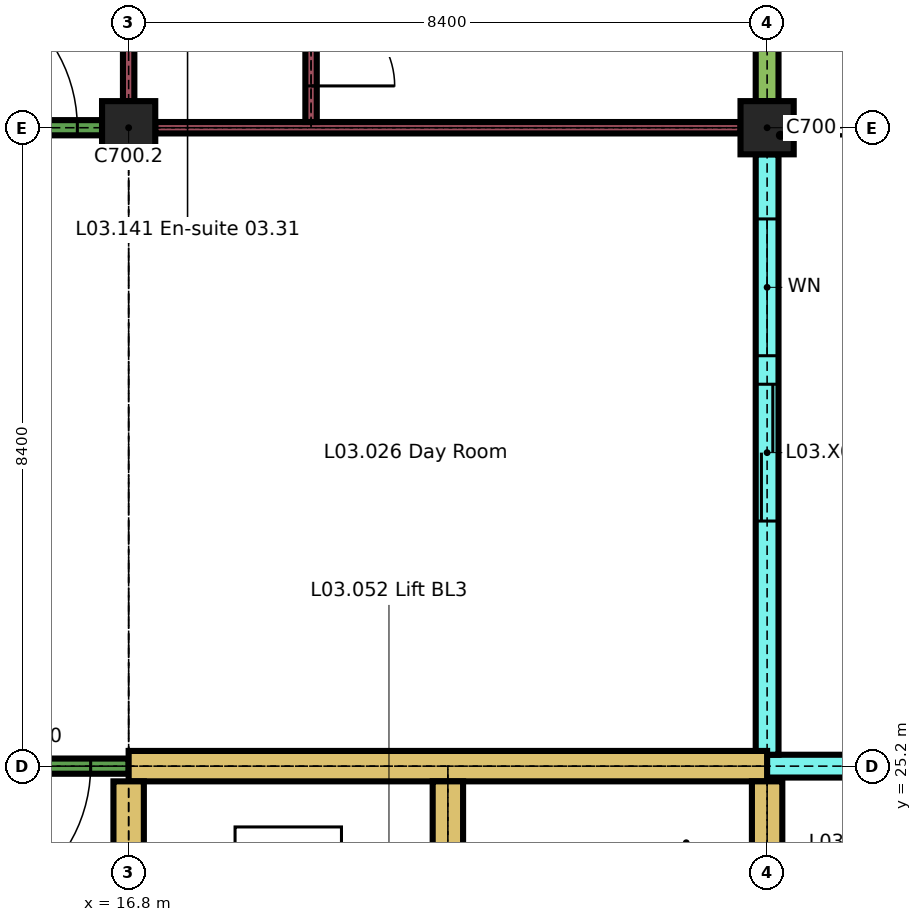
"""IFC4 building model, lengths in metres.
Left out: names, types, materials, properties, quantities, classifications, styles, units other than length and angle.
Written with IfcOpenShell. Run it as: python <this file> out.ifc"""

import sys

from ifc_helpers import new_model, si_unit, direction, frame, frame_2d, origin, origin_2d, place, context, subcontext, project, spatial, rectangle, extrude, element, fill, save


model = new_model("IFC4")
c1 = context("Model", 3, precision=1e-05, world=origin(), true_north=direction((0.0, 1.0)))
c2 = subcontext(c1, "Body", "Model", "MODEL_VIEW")
j1 = project(units=[si_unit("LENGTHUNIT", "METRE"), si_unit("PLANEANGLEUNIT", "RADIAN")], contexts=[c1])
p1 = place(None, origin())
s1 = spatial("IfcSite", under=j1, at=p1, CompositionType="ELEMENT")
p2 = place(p1, origin())
s2 = spatial("IfcBuilding", under=s1, at=p2, CompositionType="ELEMENT")
p3 = place(p2, frame((0.0, 0.0, 15.3)))
s3 = spatial("IfcBuildingStorey", under=s2, at=p3, CompositionType="ELEMENT", Elevation=15.3)
for number, where, z_axis, x_axis in (
    (1, (16.8, 33.6, 0.0), (0.0, 0.0, 1.0), (1.0, 0.0, 0.0)),
    (2, (25.2, 33.6, 0.0), (0.0, 0.0, 1.0), (1.0, 0.0, 0.0)),
):
    element("IfcColumn", number, at=place(p3, frame(where, z_axis=z_axis, x_axis=x_axis)), inside=s3, PredefinedType="COLUMN", context=c2, shape_type="SweptSolid", body=[
        extrude(rectangle(XDim=0.7, YDim=0.7, at=origin_2d()), origin(), (0.0, 0.0, 1.0), 3.26),
    ])
p4 = place(p3, frame((25.05, 25.2, 0.0), z_axis=(0.0, 0.0, 1.0), x_axis=(1.0, 0.0, 0.0)))
e3 = element("IfcWall", 3, at=p4, inside=s3, PredefinedType="SOLIDWALL", context=c2, shape_type="SweptSolid", body=[
    extrude(rectangle(XDim=8.2, YDim=0.3, at=frame_2d((4.1, 0.0))), origin(), (0.0, 0.0, 1.0), 3.26),
])
p5 = place(p4, frame((5.4, 0.0, 0.6)))
e4 = element("IfcOpeningElement", 4, at=p5, cuts=e3, PredefinedType="OPENING", context=c2, shape_type="SweptSolid", body=[
    extrude(rectangle(XDim=2.1, YDim=1.8, at=frame_2d((1.05, 0.9))), frame((0.0, 0.16, 0.0), z_axis=(0.0, -1.0, 0.0), x_axis=(1.0, 0.0, 0.0)), (0.0, 0.0, 1.0), 0.32),
])
p6 = place(p4, frame((3.275, 0.0, 0.0)))
e5 = element("IfcOpeningElement", 5, at=p6, cuts=e3, PredefinedType="OPENING", context=c2, shape_type="SweptSolid", body=[
    extrude(rectangle(XDim=1.8, YDim=2.4, at=frame_2d((0.9, 1.2))), frame((0.0, 0.16, 0.0), z_axis=(0.0, -1.0, 0.0), x_axis=(1.0, 0.0, 0.0)), (0.0, 0.0, 1.0), 0.32),
])
p7 = place(p3, frame((25.2, 25.35, 0.0), z_axis=(0.0, 0.0, 1.0), x_axis=(0.0, 1.0, 0.0)))
e6 = element("IfcWall", 6, at=p7, inside=s3, PredefinedType="SOLIDWALL", context=c2, shape_type="SweptSolid", body=[
    extrude(rectangle(XDim=7.9, YDim=0.3, at=frame_2d((3.95, 0.0))), origin(), (0.0, 0.0, 1.0), 3.26),
])
p8 = place(p7, frame((5.25, 0.0, 0.6)))
e7 = element("IfcOpeningElement", 7, at=p8, cuts=e6, PredefinedType="OPENING", context=c2, shape_type="SweptSolid", body=[
    extrude(rectangle(XDim=1.8, YDim=1.8, at=frame_2d((0.9, 0.9))), frame((0.0, 0.16, 0.0), z_axis=(0.0, -1.0, 0.0), x_axis=(1.0, 0.0, 0.0)), (0.0, 0.0, 1.0), 0.32),
])
p9 = place(p7, frame((3.075, 0.0, 0.0)))
e8 = element("IfcOpeningElement", 8, at=p9, cuts=e6, PredefinedType="OPENING", context=c2, shape_type="SweptSolid", body=[
    extrude(rectangle(XDim=1.8, YDim=2.4, at=frame_2d((0.9, 1.2))), frame((0.0, 0.16, 0.0), z_axis=(0.0, -1.0, 0.0), x_axis=(1.0, 0.0, 0.0)), (0.0, 0.0, 1.0), 0.32),
])
p10 = place(p3, frame((25.2, 33.95, 0.0), z_axis=(0.0, 0.0, 1.0), x_axis=(0.0, 1.0, 0.0)))
e9 = element("IfcWall", 9, at=p10, inside=s3, PredefinedType="SOLIDWALL", context=c2, shape_type="SweptSolid", body=[
    extrude(rectangle(XDim=3.85, YDim=0.3, at=frame_2d((1.925, 0.0))), origin(), (0.0, 0.0, 1.0), 2.96),
])
p11 = place(p10, frame((0.7, 0.0, 0.9)))
e10 = element("IfcOpeningElement", 10, at=p11, cuts=e9, PredefinedType="OPENING", context=c2, shape_type="SweptSolid", body=[
    extrude(rectangle(XDim=2.1, YDim=1.5, at=frame_2d((1.05, 0.75))), frame((0.0, 0.16, 0.0), z_axis=(0.0, -1.0, 0.0), x_axis=(1.0, 0.0, 0.0)), (0.0, 0.0, 1.0), 0.32),
])
p12 = place(p3, frame((3.6, 25.2, 0.0), z_axis=(0.0, 0.0, 1.0), x_axis=(1.0, 0.0, 0.0)))
e11 = element("IfcWall", 11, at=p12, inside=s3, PredefinedType="PARTITIONING", context=c2, shape_type="SweptSolid", body=[
    extrude(rectangle(XDim=13.2, YDim=0.2, at=frame_2d((6.6, 0.0))), origin(), (0.0, 0.0, 1.0), 3.26),
])
p13 = place(p12, frame((5.3, 0.0, 0.0)))
e12 = element("IfcOpeningElement", 12, at=p13, cuts=e11, PredefinedType="OPENING", context=c2, shape_type="SweptSolid", body=[
    extrude(rectangle(XDim=2.0, YDim=2.4, at=frame_2d((1.0, 1.2))), frame((0.0, 0.11, 0.0), z_axis=(0.0, -1.0, 0.0), x_axis=(1.0, 0.0, 0.0)), (0.0, 0.0, 1.0), 0.22),
])
p14 = place(p12, frame((10.7, 0.0, 0.0)))
e13 = element("IfcOpeningElement", 13, at=p14, cuts=e11, PredefinedType="OPENING", context=c2, shape_type="SweptSolid", body=[
    extrude(rectangle(XDim=2.0, YDim=2.4, at=frame_2d((1.0, 1.2))), frame((0.0, 0.11, 0.0), z_axis=(0.0, -1.0, 0.0), x_axis=(1.0, 0.0, 0.0)), (0.0, 0.0, 1.0), 0.22),
])
p15 = place(p3, frame((16.8, 25.2, 0.0), z_axis=(0.0, 0.0, 1.0), x_axis=(1.0, 0.0, 0.0)))
e14 = element("IfcWall", 14, at=p15, inside=s3, PredefinedType="SHEAR", context=c2, shape_type="SweptSolid", body=[
    extrude(rectangle(XDim=8.4, YDim=0.4, at=frame_2d((4.2, 0.0))), origin(), (0.0, 0.0, 1.0), 3.26),
])
p16 = place(p3, frame((8.75, 33.6, 0.0), z_axis=(0.0, 0.0, 1.0), x_axis=(1.0, 0.0, 0.0)))
e15 = element("IfcWall", 15, at=p16, inside=s3, PredefinedType="PARTITIONING", context=c2, shape_type="SweptSolid", body=[
    extrude(rectangle(XDim=7.7, YDim=0.2, at=frame_2d((3.85, 0.0))), origin(), (0.0, 0.0, 1.0), 3.26),
])
p17 = place(p16, frame((0.325, 0.0, 0.0)))
e16 = element("IfcOpeningElement", 16, at=p17, cuts=e15, PredefinedType="OPENING", context=c2, shape_type="SweptSolid", body=[
    extrude(rectangle(XDim=2.0, YDim=2.4, at=frame_2d((1.0, 1.2))), frame((0.0, 0.11, 0.0), z_axis=(0.0, -1.0, 0.0), x_axis=(1.0, 0.0, 0.0)), (0.0, 0.0, 1.0), 0.22),
])
p18 = place(p16, frame((5.375, 0.0, 0.0)))
e17 = element("IfcOpeningElement", 17, at=p18, cuts=e15, PredefinedType="OPENING", context=c2, shape_type="SweptSolid", body=[
    extrude(rectangle(XDim=2.0, YDim=2.4, at=frame_2d((1.0, 1.2))), frame((0.0, 0.11, 0.0), z_axis=(0.0, -1.0, 0.0), x_axis=(1.0, 0.0, 0.0)), (0.0, 0.0, 1.0), 0.22),
])
p19 = place(p3, frame((17.15, 33.6, 0.0), z_axis=(0.0, 0.0, 1.0), x_axis=(1.0, 0.0, 0.0)))
e18 = element("IfcWall", 18, at=p19, inside=s3, PredefinedType="PARTITIONING", context=c2, shape_type="SweptSolid", body=[
    extrude(rectangle(XDim=7.7, YDim=0.15, at=frame_2d((3.85, 0.0))), origin(), (0.0, 0.0, 1.0), 3.26),
])
p20 = place(p3, frame((16.8, 21.6, 0.0), z_axis=(0.0, 0.0, 1.0), x_axis=(0.0, 1.0, 0.0)))
e19 = element("IfcWall", 19, at=p20, inside=s3, PredefinedType="SHEAR", context=c2, shape_type="SweptSolid", body=[
    extrude(rectangle(XDim=3.4, YDim=0.4, at=frame_2d((1.7, 0.0))), origin(), (0.0, 0.0, 1.0), 3.26),
])
p21 = place(p3, frame((16.8, 33.95, 0.0), z_axis=(0.0, 0.0, 1.0), x_axis=(0.0, 1.0, 0.0)))
e20 = element("IfcWall", 20, at=p21, inside=s3, PredefinedType="PARTITIONING", context=c2, shape_type="SweptSolid", body=[
    extrude(rectangle(XDim=8.05, YDim=0.15, at=frame_2d((4.025, 0.0))), origin(), (0.0, 0.0, 1.0), 3.26),
])
p22 = place(p21, frame((2.1, 0.0, 0.0)))
e21 = element("IfcOpeningElement", 21, at=p22, cuts=e20, PredefinedType="OPENING", context=c2, shape_type="SweptSolid", body=[
    extrude(rectangle(XDim=1.5, YDim=2.4, at=frame_2d((0.75, 1.2))), frame((0.0, 0.085, 0.0), z_axis=(0.0, -1.0, 0.0), x_axis=(1.0, 0.0, 0.0)), (0.0, 0.0, 1.0), 0.17),
])
p23 = place(p21, frame((4.1, 0.0, 0.0)))
e22 = element("IfcOpeningElement", 22, at=p23, cuts=e20, PredefinedType="OPENING", context=c2, shape_type="SweptSolid", body=[
    extrude(rectangle(XDim=1.5, YDim=2.4, at=frame_2d((0.75, 1.2))), frame((0.0, 0.085, 0.0), z_axis=(0.0, -1.0, 0.0), x_axis=(1.0, 0.0, 0.0)), (0.0, 0.0, 1.0), 0.17),
])
p24 = place(p3, frame((19.2, 33.675, 0.0), z_axis=(0.0, 0.0, 1.0), x_axis=(0.0, 1.0, 0.0)))
e23 = element("IfcWall", 23, at=p24, inside=s3, PredefinedType="PARTITIONING", context=c2, shape_type="SweptSolid", body=[
    extrude(rectangle(XDim=2.05, YDim=0.15, at=frame_2d((1.025, 0.0))), origin(), (0.0, 0.0, 1.0), 3.26),
])
p25 = place(p24, frame((0.475, 0.0, 0.0)))
e24 = element("IfcOpeningElement", 24, at=p25, cuts=e23, PredefinedType="OPENING", context=c2, shape_type="SweptSolid", body=[
    extrude(rectangle(XDim=1.1, YDim=2.1, at=frame_2d((0.55, 1.05))), frame((0.0, 0.085, 0.0), z_axis=(0.0, -1.0, 0.0), x_axis=(1.0, 0.0, 0.0)), (0.0, 0.0, 1.0), 0.17),
])
p26 = place(p3, frame((21.0, 21.8, 0.0), z_axis=(0.0, 0.0, 1.0), x_axis=(0.0, 1.0, 0.0)))
e25 = element("IfcWall", 25, at=p26, inside=s3, PredefinedType="SHEAR", context=c2, shape_type="SweptSolid", body=[
    extrude(rectangle(XDim=3.2, YDim=0.4, at=frame_2d((1.6, 0.0))), origin(), (0.0, 0.0, 1.0), 3.26),
])
p27 = place(p3, frame((25.2, 21.6, 0.0), z_axis=(0.0, 0.0, 1.0), x_axis=(0.0, 1.0, 0.0)))
e26 = element("IfcWall", 26, at=p27, inside=s3, PredefinedType="SHEAR", context=c2, shape_type="SweptSolid", body=[
    extrude(rectangle(XDim=3.4, YDim=0.4, at=frame_2d((1.7, 0.0))), origin(), (0.0, 0.0, 1.0), 3.26),
])
p28 = place(p8, origin())
e27 = element("IfcWindow", 27, at=p28, inside=s3, PartitioningType="SINGLE_PANEL", PredefinedType="WINDOW", context=c2, shape_type="SweptSolid", body=[
    extrude(rectangle(XDim=1.8, YDim=1.8, at=frame_2d((0.9, 0.9))), frame((0.0, 0.03, 0.0), z_axis=(0.0, -1.0, 0.0), x_axis=(1.0, 0.0, 0.0)), (0.0, 0.0, 1.0), 0.06),
])
fill(e7, e27)
p29 = place(p9, frame((1.8, 0.0, 0.0), x_axis=(-1.0, 0.0, 0.0)))
e28 = element("IfcDoor", 28, at=p29, inside=s3, OperationType="DOUBLE_DOOR_SLIDING", PredefinedType="DOOR", context=c2, shape_type="SweptSolid", body=[
    extrude(rectangle(XDim=1.8, YDim=2.4, at=frame_2d((0.9, 1.2))), frame((0.0, 0.03, 0.0), z_axis=(0.0, -1.0, 0.0), x_axis=(1.0, 0.0, 0.0)), (0.0, 0.0, 1.0), 0.06),
])
fill(e8, e28)
p30 = place(p14, origin())
e29 = element("IfcDoor", 29, at=p30, inside=s3, OperationType="SINGLE_SWING_LEFT", PredefinedType="DOOR", context=c2, shape_type="SweptSolid", body=[
    extrude(rectangle(XDim=2.0, YDim=2.4, at=frame_2d((1.0, 1.2))), frame((0.0, 0.03, 0.0), z_axis=(0.0, -1.0, 0.0), x_axis=(1.0, 0.0, 0.0)), (0.0, 0.0, 1.0), 0.06),
])
fill(e13, e29)
p31 = place(p18, origin())
e30 = element("IfcDoor", 30, at=p31, inside=s3, OperationType="SINGLE_SWING_RIGHT", PredefinedType="DOOR", context=c2, shape_type="SweptSolid", body=[
    extrude(rectangle(XDim=2.0, YDim=2.4, at=frame_2d((1.0, 1.2))), frame((0.0, 0.03, 0.0), z_axis=(0.0, -1.0, 0.0), x_axis=(1.0, 0.0, 0.0)), (0.0, 0.0, 1.0), 0.06),
])
fill(e17, e30)
p32 = place(p25, origin())
e31 = element("IfcDoor", 31, at=p32, inside=s3, OperationType="SINGLE_SWING_LEFT", PredefinedType="DOOR", context=c2, shape_type="SweptSolid", body=[
    extrude(rectangle(XDim=1.1, YDim=2.1, at=frame_2d((0.55, 1.05))), frame((0.0, 0.025, 0.0), z_axis=(0.0, -1.0, 0.0), x_axis=(1.0, 0.0, 0.0)), (0.0, 0.0, 1.0), 0.05),
])
fill(e24, e31)
save(model, sys.argv[1])
